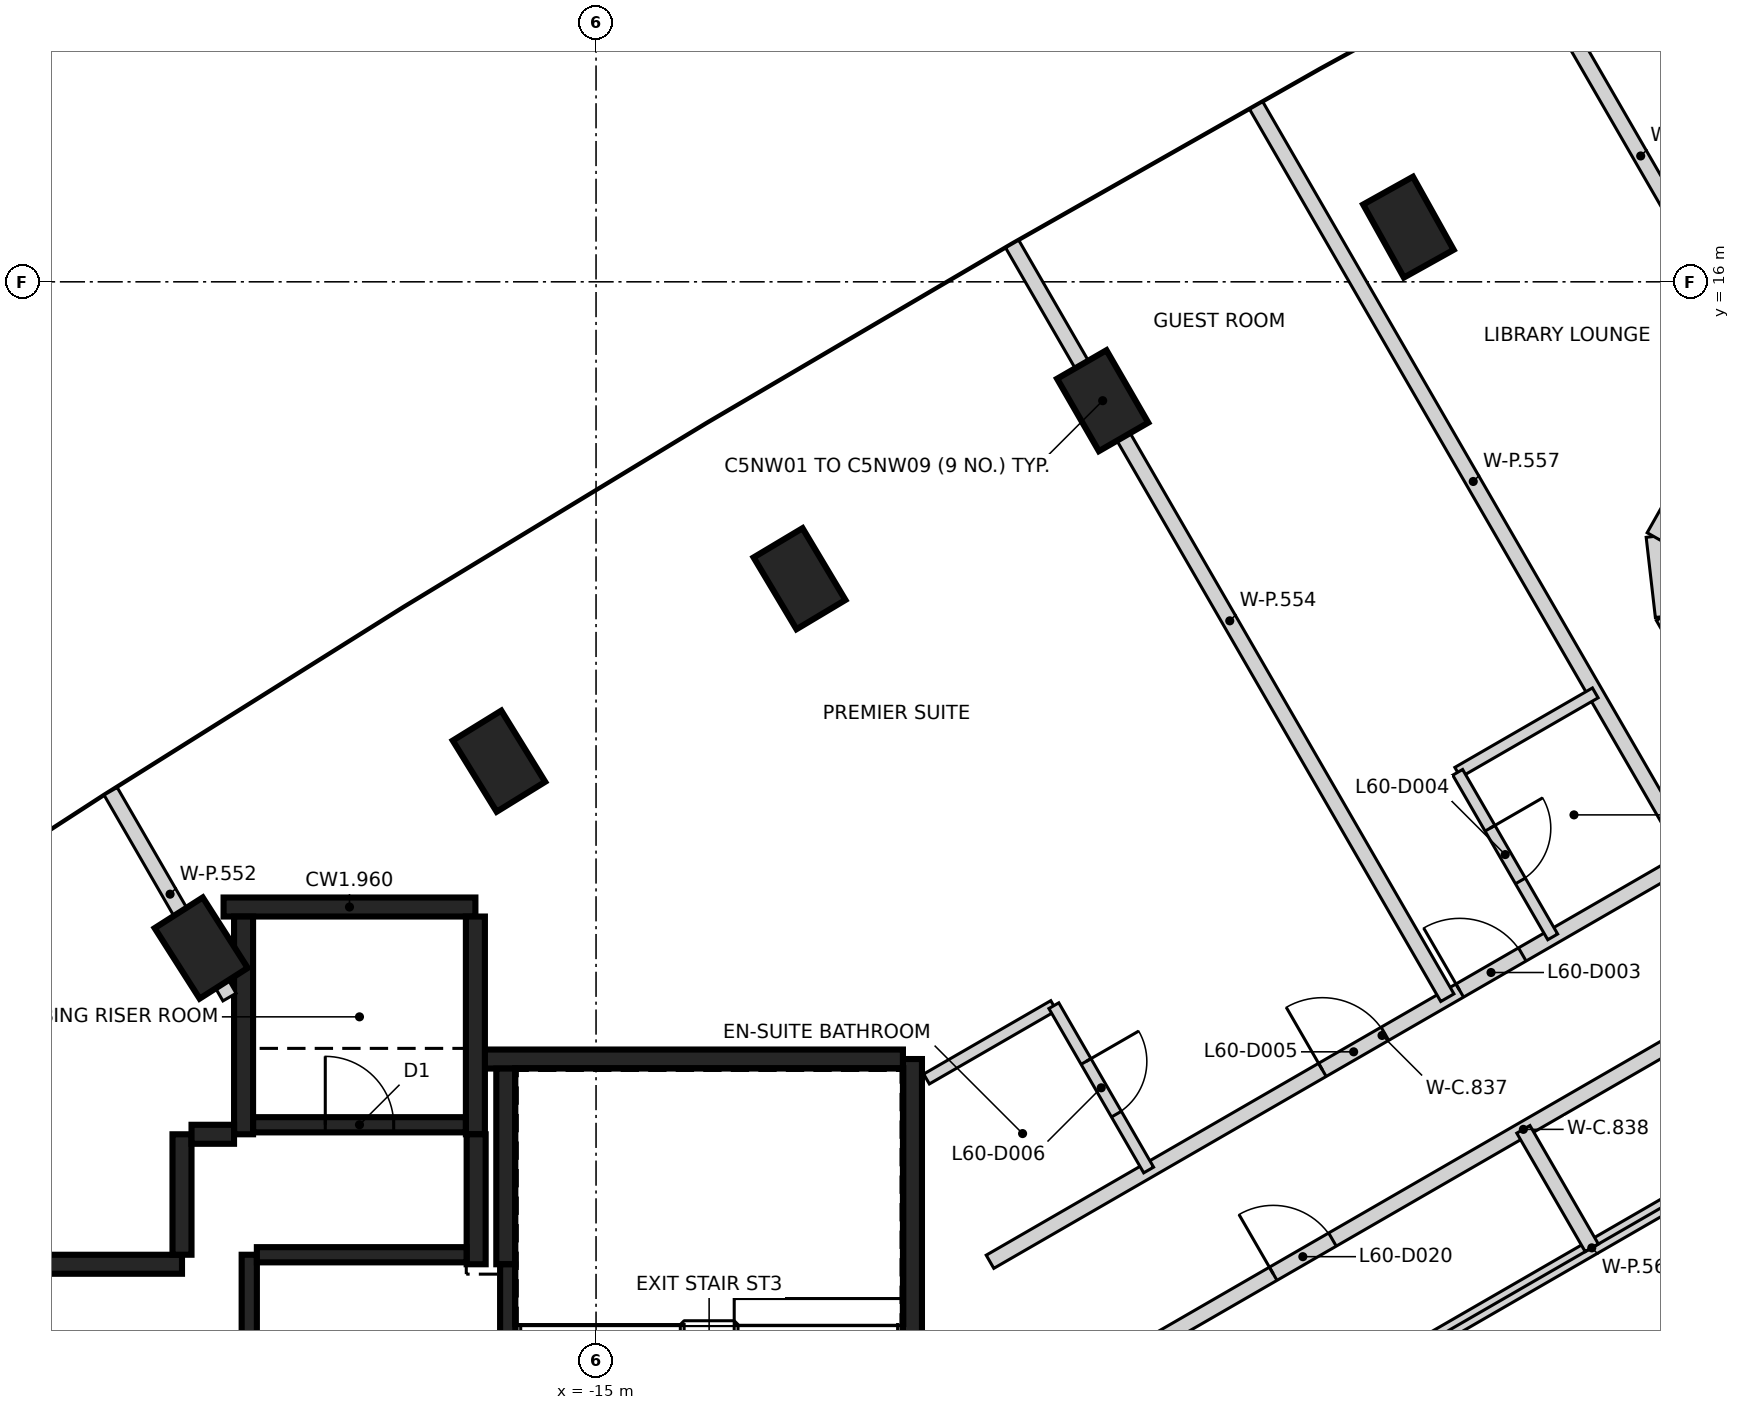
"""IFC4 building model, lengths in metres.
Left out: names, types, materials, properties, quantities, classifications, styles, units other than length and angle.
Written with IfcOpenShell. Run it as: python <this file> out.ifc"""

import sys

from ifc_helpers import new_model, si_unit, direction, frame, frame_2d, origin, origin_2d, place, context, subcontext, project, spatial, rectangle, extrude, element, fill, save


model = new_model("IFC4")
c1 = context("Model", 3, precision=1e-05, world=origin(), true_north=direction((0.0, 1.0)))
c2 = subcontext(c1, "Body", "Model", "MODEL_VIEW")
j1 = project(units=[si_unit("LENGTHUNIT", "METRE"), si_unit("PLANEANGLEUNIT", "RADIAN")], contexts=[c1])
p1 = place(None, origin())
s1 = spatial("IfcSite", under=j1, at=p1, CompositionType="ELEMENT")
p2 = place(p1, origin())
s2 = spatial("IfcBuilding", under=s1, at=p2, CompositionType="ELEMENT")
p3 = place(p2, frame((0.0, 0.0, 239.4)))
s3 = spatial("IfcBuildingStorey", under=s2, at=p3, CompositionType="ELEMENT", Elevation=239.4)
for number, where, z_axis, x_axis in (
    (1, (-4.312, 16.719, -0.35), (0.0, 0.0, 1.0), (-0.487, 0.873, 0.0)),
    (2, (-8.335, 14.436, -0.35), (0.0, 0.0, 1.0), (-0.5, 0.866, 0.0)),
    (3, (-12.323, 12.094, -0.35), (0.0, 0.0, 1.0), (-0.513, 0.858, 0.0)),
    (4, (-16.277, 9.693, -0.35), (0.0, 0.0, 1.0), (-0.525, 0.851, 0.0)),
    (5, (-20.195, 7.235, -0.35), (0.0, 0.0, 1.0), (-0.538, 0.843, 0.0)),
):
    element("IfcColumn", number, at=place(p3, frame(where, z_axis=z_axis, x_axis=x_axis)), inside=s3, PredefinedType="COLUMN", context=c2, shape_type="SweptSolid", body=[
        extrude(rectangle(XDim=1.1, YDim=0.75, at=origin_2d()), origin(), (0.0, 0.0, 1.0), 3.6),
    ])
p4 = place(p3, frame((-10.837, 5.775, 0.0), z_axis=(0.0, 0.0, 1.0), x_axis=(0.0, -1.0, 0.0)))
e6 = element("IfcWall", 6, at=p4, inside=s3, PredefinedType="SHEAR", context=c2, shape_type="SweptSolid", body=[
    extrude(rectangle(XDim=11.55, YDim=0.25, at=frame_2d((5.775, 0.0))), origin(), (0.0, 0.0, 1.0), 3.25),
])
p5 = place(p4, frame((10.025, 0.0, 0.0)))
e7 = element("IfcOpeningElement", 7, at=p5, cuts=e6, PredefinedType="OPENING", context=c2, shape_type="SweptSolid", body=[
    extrude(rectangle(XDim=1.2, YDim=2.1, at=frame_2d((0.6, 1.05))), frame((0.0, 0.135, 0.0), z_axis=(0.0, -1.0, 0.0), x_axis=(1.0, 0.0, 0.0)), (0.0, 0.0, 1.0), 0.27),
])
p6 = place(p4, frame((8.725, 0.0, 0.0)))
e8 = element("IfcOpeningElement", 8, at=p6, cuts=e6, PredefinedType="OPENING", context=c2, shape_type="SweptSolid", body=[
    extrude(rectangle(XDim=1.2, YDim=2.1, at=frame_2d((0.6, 1.05))), frame((0.0, 0.135, 0.0), z_axis=(0.0, -1.0, 0.0), x_axis=(1.0, 0.0, 0.0)), (0.0, 0.0, 1.0), 0.27),
])
p7 = place(p3, frame((-16.472, 5.775, 0.0), z_axis=(0.0, 0.0, 1.0), x_axis=(1.0, 0.0, 0.0)))
e9 = element("IfcWall", 9, at=p7, inside=s3, PredefinedType="SHEAR", context=c2, shape_type="SweptSolid", body=[
    extrude(rectangle(XDim=5.51, YDim=0.25, at=frame_2d((2.755, 0.0))), origin(), (0.0, 0.0, 1.0), 3.25),
])
p8 = place(p3, frame((-19.9, 7.775, 0.0), z_axis=(0.0, 0.0, 1.0), x_axis=(1.0, 0.0, 0.0)))
e10 = element("IfcWall", 10, at=p8, inside=s3, PredefinedType="SHEAR", context=c2, shape_type="SweptSolid", body=[
    extrude(rectangle(XDim=3.313, YDim=0.25, at=frame_2d((1.656, 0.0))), origin(), (0.0, 0.0, 1.0), 3.25),
])
for number, where, z_axis, x_axis in (
    (11, (-16.587, 7.65, 0.0), (0.0, 0.0, 1.0), (0.0, -1.0, 0.0)),
    (12, (-19.637, 4.785, 0.0), (0.0, 0.0, 1.0), (0.0, 1.0, 0.0)),
):
    element("IfcWall", number, at=place(p3, frame(where, z_axis=z_axis, x_axis=x_axis)), inside=s3, PredefinedType="SHEAR", context=c2, shape_type="SweptSolid", body=[
        extrude(rectangle(XDim=2.865, YDim=0.25, at=frame_2d((1.432, 0.0))), origin(), (0.0, 0.0, 1.0), 3.25),
    ])
p9 = place(p3, frame((-16.187, 3.075, 0.0), z_axis=(0.0, 0.0, 1.0), x_axis=(0.0, 1.0, 0.0)))
e13 = element("IfcWall", 13, at=p9, inside=s3, PredefinedType="SHEAR", context=c2, shape_type="SweptSolid", body=[
    extrude(rectangle(XDim=2.575, YDim=0.25, at=frame_2d((1.287, 0.0))), origin(), (0.0, 0.0, 1.0), 3.25),
])
p10 = place(p3, frame((-22.312, 3.075, 0.0), z_axis=(0.0, 0.0, 1.0), x_axis=(1.0, 0.0, 0.0)))
e14 = element("IfcWall", 14, at=p10, inside=s3, PredefinedType="SHEAR", context=c2, shape_type="SweptSolid", body=[
    extrude(rectangle(XDim=1.865, YDim=0.25, at=frame_2d((0.932, 0.0))), origin(), (0.0, 0.0, 1.0), 3.25),
])
p11 = place(p3, frame((-16.577, 4.785, 0.0), z_axis=(0.0, 0.0, 1.0), x_axis=(0.0, -1.0, 0.0)))
e15 = element("IfcWall", 15, at=p11, inside=s3, PredefinedType="SHEAR", context=c2, shape_type="SweptSolid", body=[
    extrude(rectangle(XDim=1.71, YDim=0.25, at=frame_2d((0.855, 0.0))), origin(), (0.0, 0.0, 1.0), 3.25),
])
p12 = place(p3, frame((-20.447, 3.2, 0.0), z_axis=(0.0, 0.0, 1.0), x_axis=(0.0, 1.0, 0.0)))
e16 = element("IfcWall", 16, at=p12, inside=s3, PredefinedType="SHEAR", context=c2, shape_type="SweptSolid", body=[
    extrude(rectangle(XDim=1.584, YDim=0.25, at=frame_2d((0.792, 0.0))), origin(), (0.0, 0.0, 1.0), 3.25),
])
p13 = place(p3, frame((-20.322, 4.785, 0.0), z_axis=(0.0, 0.0, 1.0), x_axis=(1.0, 0.0, 0.0)))
e17 = element("IfcWall", 17, at=p13, inside=s3, PredefinedType="SHEAR", context=c2, shape_type="SweptSolid", body=[
    extrude(rectangle(XDim=0.559, YDim=0.25, at=frame_2d((0.28, 0.0))), origin(), (0.0, 0.0, 1.0), 3.25),
])
p14 = place(p3, frame((-16.162, 3.074, 0.0), z_axis=(0.0, 0.0, 1.0), x_axis=(0.0, -1.0, 0.0)))
e18 = element("IfcWall", 18, at=p14, inside=s3, PredefinedType="SHEAR", context=c2, shape_type="SweptSolid", body=[
    extrude(rectangle(XDim=5.974, YDim=0.2, at=frame_2d((2.987, 0.0))), origin(), (0.0, 0.0, 1.0), 3.25),
])
p15 = place(p3, frame((-19.562, -2.9, 0.0), z_axis=(0.0, 0.0, 1.0), x_axis=(0.0, 1.0, 0.0)))
e19 = element("IfcWall", 19, at=p15, inside=s3, PredefinedType="SHEAR", context=c2, shape_type="SweptSolid", body=[
    extrude(rectangle(XDim=6.1, YDim=0.2, at=frame_2d((3.05, 0.0))), origin(), (0.0, 0.0, 1.0), 3.25),
])
p16 = place(p3, frame((-19.511, 4.91, 0.0), z_axis=(0.0, 0.0, 1.0), x_axis=(1.0, 0.0, 0.0)))
e20 = element("IfcWall", 20, at=p16, inside=s3, PredefinedType="SHEAR", context=c2, shape_type="SweptSolid", body=[
    extrude(rectangle(XDim=2.798, YDim=0.2, at=frame_2d((1.399, 0.0))), origin(), (0.0, 0.0, 1.0), 3.25),
])
p17 = place(p16, frame((0.949, 0.0, 0.0)))
e21 = element("IfcOpeningElement", 21, at=p17, cuts=e20, PredefinedType="OPENING", context=c2, shape_type="SweptSolid", body=[
    extrude(rectangle(XDim=0.9, YDim=2.1, at=frame_2d((0.45, 1.05))), frame((0.0, 0.11, 0.0), z_axis=(0.0, -1.0, 0.0), x_axis=(1.0, 0.0, 0.0)), (0.0, 0.0, 1.0), 0.22),
])
p18 = place(p3, frame((-19.462, 3.2, 0.0), z_axis=(0.0, 0.0, 1.0), x_axis=(1.0, 0.0, 0.0)))
e22 = element("IfcWall", 22, at=p18, inside=s3, PredefinedType="SHEAR", context=c2, shape_type="SweptSolid", body=[
    extrude(rectangle(XDim=2.759, YDim=0.2, at=frame_2d((1.379, 0.0))), origin(), (0.0, 0.0, 1.0), 3.25),
])
p19 = place(p3, frame((-9.817, 3.108, 0.0), z_axis=(0.0, 0.0, 1.0), x_axis=(0.86603471326, 0.499983875168, 0.0)))
e23 = element("IfcWall", 23, at=p19, inside=s3, PredefinedType="PARTITIONING", context=c2, shape_type="SweptSolid", body=[
    extrude(rectangle(XDim=11.911, YDim=0.2, at=frame_2d((5.955, 0.0))), origin(), (0.0, 0.0, 1.0), 3.25),
])
p20 = place(p19, frame((7.136, 0.0, 0.0)))
e24 = element("IfcOpeningElement", 24, at=p20, cuts=e23, PredefinedType="OPENING", context=c2, shape_type="SweptSolid", body=[
    extrude(rectangle(XDim=0.95, YDim=2.1, at=frame_2d((0.475, 1.05))), frame((0.0, 0.11, 0.0), z_axis=(0.0, -1.0, 0.0), x_axis=(1.0, 0.0, 0.0)), (0.0, 0.0, 1.0), 0.22),
])
p21 = place(p19, frame((5.049, 0.0, 0.0)))
e25 = element("IfcOpeningElement", 25, at=p21, cuts=e23, PredefinedType="OPENING", context=c2, shape_type="SweptSolid", body=[
    extrude(rectangle(XDim=0.95, YDim=2.1, at=frame_2d((0.475, 1.05))), frame((0.0, 0.11, 0.0), z_axis=(0.0, -1.0, 0.0), x_axis=(1.0, 0.0, 0.0)), (0.0, 0.0, 1.0), 0.22),
])
p22 = place(p3, frame((-8.612, 1.494, 0.0), z_axis=(0.0, 0.0, 1.0), x_axis=(0.8660441356, 0.49996755414, 0.0)))
e26 = element("IfcWall", 26, at=p22, inside=s3, PredefinedType="PARTITIONING", context=c2, shape_type="SweptSolid", body=[
    extrude(rectangle(XDim=13.422, YDim=0.2, at=frame_2d((6.711, 0.0))), origin(), (0.0, 0.0, 1.0), 3.25),
])
p23 = place(p22, frame((9.611, 0.0, 0.0)))
e27 = element("IfcOpeningElement", 27, at=p23, cuts=e26, PredefinedType="OPENING", context=c2, shape_type="SweptSolid", body=[
    extrude(rectangle(XDim=0.9, YDim=2.1, at=frame_2d((0.45, 1.05))), frame((0.0, 0.11, 0.0), z_axis=(0.0, -1.0, 0.0), x_axis=(1.0, 0.0, 0.0)), (0.0, 0.0, 1.0), 0.22),
])
p24 = place(p22, frame((2.911, 0.0, 0.0)))
e28 = element("IfcOpeningElement", 28, at=p24, cuts=e26, PredefinedType="OPENING", context=c2, shape_type="SweptSolid", body=[
    extrude(rectangle(XDim=0.9, YDim=2.1, at=frame_2d((0.45, 1.05))), frame((0.0, 0.11, 0.0), z_axis=(0.0, -1.0, 0.0), x_axis=(1.0, 0.0, 0.0)), (0.0, 0.0, 1.0), 0.22),
])
p25 = place(p3, frame((-1.085, 12.65, 0.0), z_axis=(0.0, 0.0, 1.0), x_axis=(0.113812454263, -0.993502252264, 0.0)))
e29 = element("IfcWall", 29, at=p25, inside=s3, PredefinedType="PARTITIONING", context=c2, shape_type="SweptSolid", body=[
    extrude(rectangle(XDim=1.062, YDim=0.2, at=frame_2d((0.531, 0.0))), origin(), (0.0, 0.0, 1.0), 3.25),
])
p26 = place(p3, frame((-1.084, 12.65, 0.0), z_axis=(0.0, 0.0, 1.0), x_axis=(0.492373019537, 0.87038428848, 0.0)))
e30 = element("IfcWall", 30, at=p26, inside=s3, PredefinedType="PARTITIONING", context=c2, shape_type="SweptSolid", body=[
    extrude(rectangle(XDim=8.738, YDim=0.2, at=frame_2d((4.369, 0.0))), origin(), (0.0, 0.0, 1.0), 3.25),
])
p27 = place(p26, frame((5.23, 0.0, 0.0)))
e31 = element("IfcOpeningElement", 31, at=p27, cuts=e30, PredefinedType="OPENING", context=c2, shape_type="SweptSolid", body=[
    extrude(rectangle(XDim=1.0, YDim=2.1, at=frame_2d((0.5, 1.05))), frame((0.0, 0.11, 0.0), z_axis=(0.0, -1.0, 0.0), x_axis=(1.0, 0.0, 0.0)), (0.0, 0.0, 1.0), 0.22),
])
p28 = place(p3, frame((-0.964, 11.595, 0.0), z_axis=(0.0, 0.0, 1.0), x_axis=(0.500081432713, -0.865978383481, 0.0)))
e32 = element("IfcWall", 32, at=p28, inside=s3, PredefinedType="PARTITIONING", context=c2, shape_type="SweptSolid", body=[
    extrude(rectangle(XDim=2.924, YDim=0.2, at=frame_2d((1.462, 0.0))), origin(), (0.0, 0.0, 1.0), 3.25),
])
p29 = place(p28, frame((0.962, 0.0, 0.0)))
e33 = element("IfcOpeningElement", 33, at=p29, cuts=e32, PredefinedType="OPENING", context=c2, shape_type="SweptSolid", body=[
    extrude(rectangle(XDim=1.0, YDim=2.1, at=frame_2d((0.5, 1.05))), frame((0.0, 0.11, 0.0), z_axis=(0.0, -1.0, 0.0), x_axis=(1.0, 0.0, 0.0)), (0.0, 0.0, 1.0), 0.22),
])
p30 = place(p3, frame((-21.386, 9.298, 0.0), z_axis=(0.0, 0.0, 1.0), x_axis=(0.500017489778, -0.866015305821, 0.0)))
e34 = element("IfcWall", 34, at=p30, inside=s3, PredefinedType="PARTITIONING", context=c2, shape_type="SweptSolid", body=[
    extrude(rectangle(XDim=3.128, YDim=0.2, at=frame_2d((1.564, 0.0))), origin(), (0.0, 0.0, 1.0), 3.25),
])
p31 = place(p3, frame((-9.525, 16.498, 0.0), z_axis=(0.0, 0.0, 1.0), x_axis=(0.500030684965, -0.866007687087, 0.0)))
e35 = element("IfcWall", 35, at=p31, inside=s3, PredefinedType="PARTITIONING", context=c2, shape_type="SweptSolid", body=[
    extrude(rectangle(XDim=11.45, YDim=0.2, at=frame_2d((5.725, 0.0))), origin(), (0.0, 0.0, 1.0), 3.25),
])
p32 = place(p3, frame((-6.315, 18.32, 0.0), z_axis=(0.0, 0.0, 1.0), x_axis=(0.500012296027, -0.866018304553, 0.0)))
e36 = element("IfcWall", 36, at=p32, inside=s3, PredefinedType="PARTITIONING", context=c2, shape_type="SweptSolid", body=[
    extrude(rectangle(XDim=11.423, YDim=0.2, at=frame_2d((5.711, 0.0))), origin(), (0.0, 0.0, 1.0), 2.35),
])
p33 = place(p3, frame((-6.0, 0.924, 0.0), z_axis=(0.0, 0.0, 1.0), x_axis=(0.866012967051, 0.500021540435, 0.0)))
e37 = element("IfcWall", 37, at=p33, inside=s3, PredefinedType="PARTITIONING", context=c2, shape_type="SweptSolid", body=[
    extrude(rectangle(XDim=9.468, YDim=0.2, at=frame_2d((4.734, 0.0))), origin(), (0.0, 0.0, 1.0), 3.25),
])
p34 = place(p3, frame((-2.8, 4.85, 0.0), z_axis=(0.0, 0.0, 1.0), x_axis=(0.500004188491, -0.866022985545, 0.0)))
e38 = element("IfcWall", 38, at=p34, inside=s3, PredefinedType="PARTITIONING", context=c2, shape_type="SweptSolid", body=[
    extrude(rectangle(XDim=1.8, YDim=0.2, at=frame_2d((0.9, 0.0))), origin(), (0.0, 0.0, 1.0), 3.25),
])
p35 = place(p3, frame((-2.771, 20.279, 0.0), z_axis=(0.0, 0.0, 1.0), x_axis=(0.499939878606, -0.866060112105, 0.0)))
e39 = element("IfcWall", 39, at=p35, inside=s3, PredefinedType="PARTITIONING", context=c2, shape_type="SweptSolid", body=[
    extrude(rectangle(XDim=6.059, YDim=0.2, at=frame_2d((3.029, 0.0))), origin(), (0.0, 0.0, 1.0), 2.35),
])
p36 = place(p3, frame((-10.652, 5.512, 0.0), z_axis=(0.0, 0.0, 1.0), x_axis=(0.866017156151, 0.500014285048, 0.0)))
e40 = element("IfcWall", 40, at=p36, inside=s3, PredefinedType="PARTITIONING", context=c2, shape_type="SweptSolid", body=[
    extrude(rectangle(XDim=1.931, YDim=0.15, at=frame_2d((0.966, 0.0))), origin(), (0.0, 0.0, 1.0), 3.25),
])
p37 = place(p3, frame((-8.977, 6.477, 0.0), z_axis=(0.0, 0.0, 1.0), x_axis=(0.499632127845, -0.86623769072, 0.0)))
e41 = element("IfcWall", 41, at=p37, inside=s3, PredefinedType="PARTITIONING", context=c2, shape_type="SweptSolid", body=[
    extrude(rectangle(XDim=2.496, YDim=0.15, at=frame_2d((1.248, 0.0))), origin(), (0.0, 0.0, 1.0), 3.25),
])
p38 = place(p37, frame((0.847, 0.0, 0.0)))
e42 = element("IfcOpeningElement", 42, at=p38, cuts=e41, PredefinedType="OPENING", context=c2, shape_type="SweptSolid", body=[
    extrude(rectangle(XDim=0.8, YDim=2.1, at=frame_2d((0.4, 1.05))), frame((0.0, 0.085, 0.0), z_axis=(0.0, -1.0, 0.0), x_axis=(1.0, 0.0, 0.0)), (0.0, 0.0, 1.0), 0.17),
])
p39 = place(p3, frame((-3.664, 9.547, 0.0), z_axis=(0.0, 0.0, 1.0), x_axis=(0.866049423672, 0.499958394027, 0.0)))
e43 = element("IfcWall", 43, at=p39, inside=s3, PredefinedType="PARTITIONING", context=c2, shape_type="SweptSolid", body=[
    extrude(rectangle(XDim=2.09, YDim=0.15, at=frame_2d((1.045, 0.0))), origin(), (0.0, 0.0, 1.0), 3.25),
])
p40 = place(p3, frame((-3.664, 9.547, 0.0), z_axis=(0.0, 0.0, 1.0), x_axis=(0.500004234368, -0.866022959057, 0.0)))
e44 = element("IfcWall", 44, at=p40, inside=s3, PredefinedType="PARTITIONING", context=c2, shape_type="SweptSolid", body=[
    extrude(rectangle(XDim=2.5, YDim=0.15, at=frame_2d((1.25, 0.0))), origin(), (0.0, 0.0, 1.0), 3.25),
])
p41 = place(p40, frame((0.85, 0.0, 0.0)))
e45 = element("IfcOpeningElement", 45, at=p41, cuts=e44, PredefinedType="OPENING", context=c2, shape_type="SweptSolid", body=[
    extrude(rectangle(XDim=0.8, YDim=2.1, at=frame_2d((0.4, 1.05))), frame((0.0, 0.085, 0.0), z_axis=(0.0, -1.0, 0.0), x_axis=(1.0, 0.0, 0.0)), (0.0, 0.0, 1.0), 0.17),
])
p42 = place(p17, origin())
e46 = element("IfcDoor", 46, at=p42, inside=s3, OperationType="SINGLE_SWING_RIGHT", PredefinedType="DOOR", context=c2, shape_type="SweptSolid", body=[
    extrude(rectangle(XDim=0.9, YDim=2.1, at=frame_2d((0.45, 1.05))), frame((0.0, 0.025, 0.0), z_axis=(0.0, -1.0, 0.0), x_axis=(1.0, 0.0, 0.0)), (0.0, 0.0, 1.0), 0.05),
])
fill(e21, e46)
p43 = place(p20, origin())
e47 = element("IfcDoor", 47, at=p43, inside=s3, OperationType="SINGLE_SWING_LEFT", PredefinedType="DOOR", context=c2, shape_type="SweptSolid", body=[
    extrude(rectangle(XDim=0.95, YDim=2.1, at=frame_2d((0.475, 1.05))), frame((0.0, 0.025, 0.0), z_axis=(0.0, -1.0, 0.0), x_axis=(1.0, 0.0, 0.0)), (0.0, 0.0, 1.0), 0.05),
])
fill(e24, e47)
p44 = place(p41, origin())
e48 = element("IfcDoor", 48, at=p44, inside=s3, OperationType="SINGLE_SWING_LEFT", PredefinedType="DOOR", context=c2, shape_type="SweptSolid", body=[
    extrude(rectangle(XDim=0.8, YDim=2.1, at=frame_2d((0.4, 1.05))), frame((0.0, 0.025, 0.0), z_axis=(0.0, -1.0, 0.0), x_axis=(1.0, 0.0, 0.0)), (0.0, 0.0, 1.0), 0.05),
])
fill(e45, e48)
p45 = place(p21, origin())
e49 = element("IfcDoor", 49, at=p45, inside=s3, OperationType="SINGLE_SWING_LEFT", PredefinedType="DOOR", context=c2, shape_type="SweptSolid", body=[
    extrude(rectangle(XDim=0.95, YDim=2.1, at=frame_2d((0.475, 1.05))), frame((0.0, 0.025, 0.0), z_axis=(0.0, -1.0, 0.0), x_axis=(1.0, 0.0, 0.0)), (0.0, 0.0, 1.0), 0.05),
])
fill(e25, e49)
p46 = place(p38, frame((0.8, 0.0, 0.0), z_axis=(0.0, 0.0, 1.0), x_axis=(-1.0, 0.0, 0.0)))
e50 = element("IfcDoor", 50, at=p46, inside=s3, OperationType="SINGLE_SWING_LEFT", PredefinedType="DOOR", context=c2, shape_type="SweptSolid", body=[
    extrude(rectangle(XDim=0.8, YDim=2.1, at=frame_2d((0.4, 1.05))), frame((0.0, 0.025, 0.0), z_axis=(0.0, -1.0, 0.0), x_axis=(1.0, 0.0, 0.0)), (0.0, 0.0, 1.0), 0.05),
])
fill(e42, e50)
p47 = place(p24, frame((0.9, 0.0, 0.0), z_axis=(0.0, 0.0, 1.0), x_axis=(-1.0, 0.0, 0.0)))
e51 = element("IfcDoor", 51, at=p47, inside=s3, OperationType="SINGLE_SWING_LEFT", PredefinedType="DOOR", context=c2, shape_type="SweptSolid", body=[
    extrude(rectangle(XDim=0.9, YDim=2.1, at=frame_2d((0.45, 1.05))), frame((0.0, 0.025, 0.0), z_axis=(0.0, -1.0, 0.0), x_axis=(1.0, 0.0, 0.0)), (0.0, 0.0, 1.0), 0.05),
])
fill(e28, e51)
save(model, sys.argv[1])
